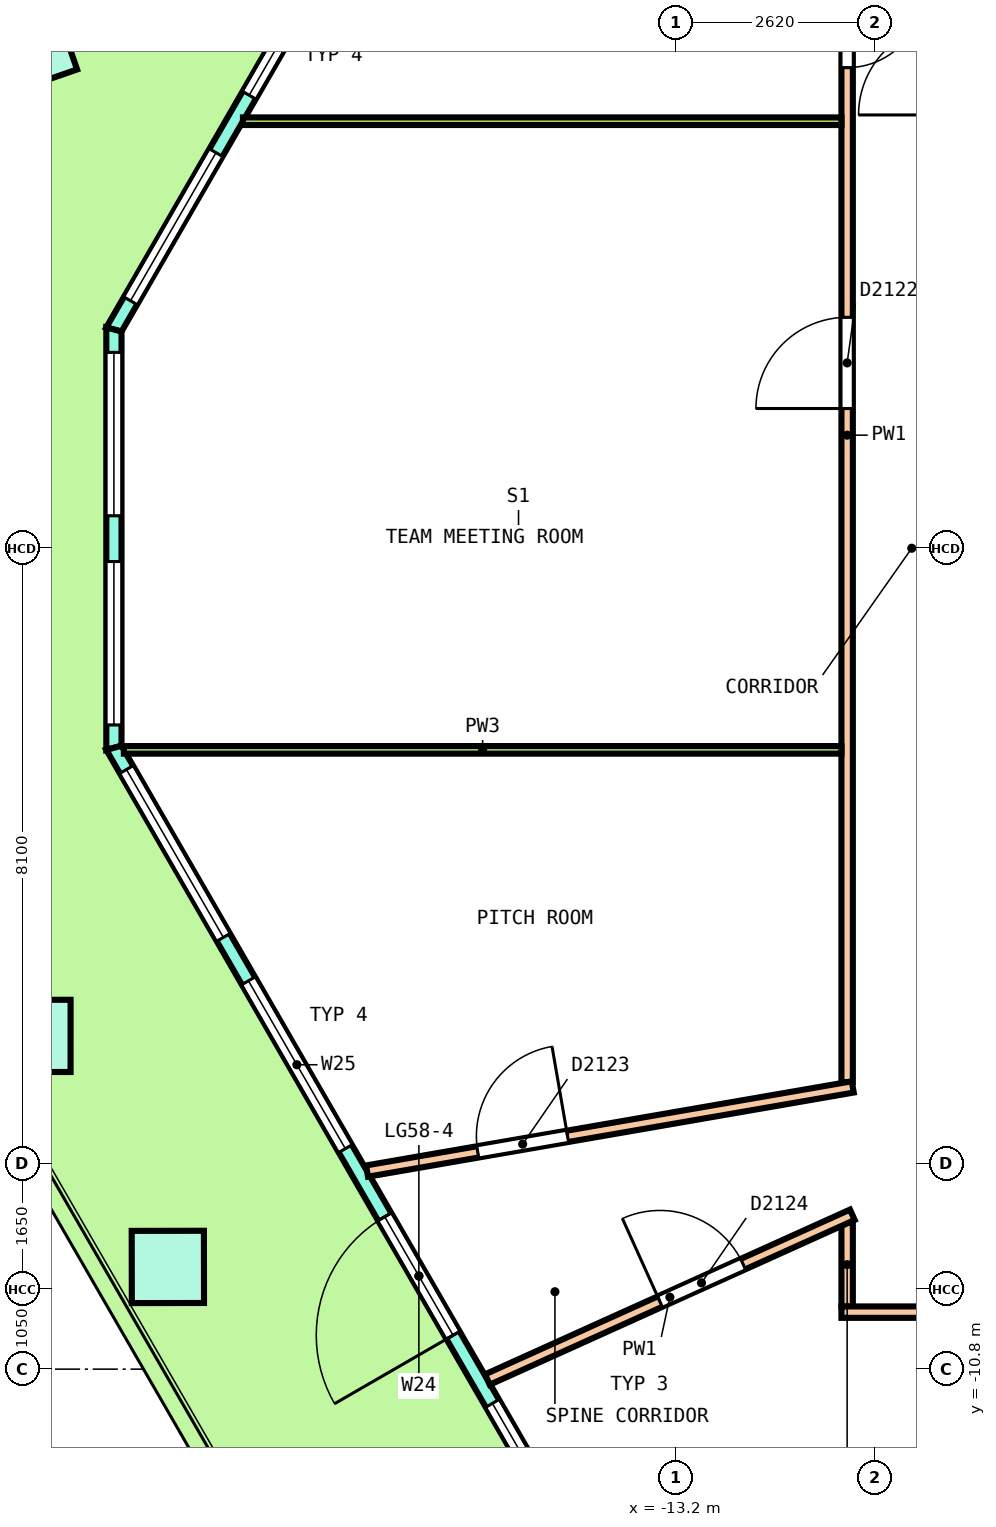
"""IFC4 building model, lengths in metres.
Left out: names, types, materials, properties, quantities, classifications, styles, units other than length and angle.
Written with IfcOpenShell. Run it as: python <this file> out.ifc"""

import sys

from ifc_helpers import new_model, si_unit, direction, frame, frame_2d, origin, origin_2d, place, context, subcontext, project, spatial, polyline, rectangle, outline, extrude, element, fill, save


model = new_model("IFC4")
c1 = context("Model", 3, precision=1e-05, world=origin(), true_north=direction((0.0, 1.0)))
c2 = subcontext(c1, "Body", "Model", "MODEL_VIEW")
j1 = project(units=[si_unit("LENGTHUNIT", "METRE"), si_unit("PLANEANGLEUNIT", "RADIAN")], contexts=[c1])
p1 = place(None, origin())
s1 = spatial("IfcSite", under=j1, at=p1, CompositionType="ELEMENT")
p2 = place(p1, origin())
s2 = spatial("IfcBuilding", under=s1, at=p2, CompositionType="ELEMENT")
p3 = place(p2, frame((0.0, 0.0, 267.0)))
s3 = spatial("IfcBuildingStorey", under=s2, at=p3, CompositionType="ELEMENT", Elevation=267.0)
p4 = place(p3, frame((-21.685, 6.592, 0.0), z_axis=(-0.021793949015, 0.025136579231, 0.999446434868), x_axis=(-0.499665408411, -0.866150057728, 0.010888394553)))
e1 = element("IfcColumn", 1, at=p4, inside=s3, PredefinedType="COLUMN", context=c2, shape_type="SweptSolid", body=[
    extrude(rectangle(XDim=0.95, YDim=0.95, at=origin_2d()), origin(), (0.0, 0.0, 1.0), 3.652),
])
p5 = place(p3, frame((-21.642, -6.416, 0.0), z_axis=(-0.010900423214, 0.018858400897, 0.999762742599), x_axis=(0.500226175498, -0.86562076849, 0.02178206845)))
e2 = element("IfcColumn", 2, at=p5, inside=s3, PredefinedType="COLUMN", context=c2, shape_type="SweptSolid", body=[
    extrude(rectangle(XDim=0.95, YDim=0.95, at=origin_2d()), origin(), (0.0, 0.0, 1.0), 3.651),
])
p6 = place(p3, frame((-19.887, -9.455, 0.0), z_axis=(-0.003611945175, 0.00628746012, 0.999973710503), x_axis=(0.499382072477, -0.866351526517, 0.007251081967)))
e3 = element("IfcColumn", 3, at=p6, inside=s3, PredefinedType="COLUMN", context=c2, shape_type="SweptSolid", body=[
    extrude(rectangle(XDim=0.95, YDim=0.95, at=origin_2d()), origin(), (0.0, 0.0, 1.0), 3.65),
])
p7 = place(p3, frame((-12.79, 16.398, 0.0), z_axis=(0.0, 0.0, 1.0), x_axis=(-0.500008968961, -0.86602022549, 0.0)))
e4 = element("IfcWall", 4, at=p7, inside=s3, PredefinedType="SOLIDWALL", context=c2, shape_type="SweptSolid", body=[
    extrude(outline(polyline([(-0.027, -0.1), (1.018, -0.1), (2.062, -0.1), (3.106, -0.1), (4.151, -0.1), (5.195, -0.1), (6.24, -0.1), (7.284, -0.1), (8.328, -0.1), (9.373, -0.1), (10.417, -0.1), (11.462, -0.1), (12.506, -0.1), (13.551, -0.1), (14.595, -0.1), (15.639, -0.1), (15.586, 0.1), (14.548, 0.1), (13.511, 0.1), (12.474, 0.1), (11.437, 0.1), (10.399, 0.1), (9.362, 0.1), (8.325, 0.1), (7.288, 0.1), (6.25, 0.1), (5.213, 0.1), (4.176, 0.1), (3.139, 0.1), (2.101, 0.1), (1.064, 0.1), (0.027, 0.1), (-0.027, -0.1)])), origin(), (0.0, 0.0, 1.0), 3.7),
])
p8 = place(p7, frame((0.436, 0.0, 0.1)))
e5 = element("IfcOpeningElement", 5, at=p8, cuts=e4, PredefinedType="OPENING", context=c2, shape_type="SweptSolid", body=[
    extrude(rectangle(XDim=2.25, YDim=2.75, at=frame_2d((1.125, 1.375))), frame((0.0, 0.11, 0.0), z_axis=(0.0, -1.0, 0.0), x_axis=(1.0, 0.0, 0.0)), (0.0, 0.0, 1.0), 0.22),
])
p9 = place(p7, frame((3.559, 0.0, 0.1)))
e6 = element("IfcOpeningElement", 6, at=p9, cuts=e4, PredefinedType="OPENING", context=c2, shape_type="SweptSolid", body=[
    extrude(rectangle(XDim=2.25, YDim=2.75, at=frame_2d((1.125, 1.375))), frame((0.0, 0.11, 0.0), z_axis=(0.0, -1.0, 0.0), x_axis=(1.0, 0.0, 0.0)), (0.0, 0.0, 1.0), 0.22),
])
p10 = place(p7, frame((6.906, 0.0, 0.0)))
e7 = element("IfcOpeningElement", 7, at=p10, cuts=e4, PredefinedType="OPENING", context=c2, shape_type="SweptSolid", body=[
    extrude(rectangle(XDim=1.8, YDim=2.4, at=frame_2d((0.9, 1.2))), frame((0.0, 0.11, 0.0), z_axis=(0.0, -1.0, 0.0), x_axis=(1.0, 0.0, 0.0)), (0.0, 0.0, 1.0), 0.22),
])
p11 = place(p7, frame((6.906, 0.0, 2.55)))
e8 = element("IfcOpeningElement", 8, at=p11, cuts=e4, PredefinedType="OPENING", context=c2, shape_type="SweptSolid", body=[
    extrude(rectangle(XDim=1.8, YDim=0.3, at=frame_2d((0.9, 0.15))), frame((0.0, 0.11, 0.0), z_axis=(0.0, -1.0, 0.0), x_axis=(1.0, 0.0, 0.0)), (0.0, 0.0, 1.0), 0.22),
])
p12 = place(p7, frame((9.804, 0.0, 0.1)))
e9 = element("IfcOpeningElement", 9, at=p12, cuts=e4, PredefinedType="OPENING", context=c2, shape_type="SweptSolid", body=[
    extrude(rectangle(XDim=2.25, YDim=2.75, at=frame_2d((1.125, 1.375))), frame((0.0, 0.11, 0.0), z_axis=(0.0, -1.0, 0.0), x_axis=(1.0, 0.0, 0.0)), (0.0, 0.0, 1.0), 0.22),
])
p13 = place(p7, frame((12.926, 0.0, 0.1)))
e10 = element("IfcOpeningElement", 10, at=p13, cuts=e4, PredefinedType="OPENING", context=c2, shape_type="SweptSolid", body=[
    extrude(rectangle(XDim=2.25, YDim=2.75, at=frame_2d((1.125, 1.375))), frame((0.0, 0.11, 0.0), z_axis=(0.0, -1.0, 0.0), x_axis=(1.0, 0.0, 0.0)), (0.0, 0.0, 1.0), 0.22),
])
p14 = place(p3, frame((-20.596, 2.877, 0.0), z_axis=(0.0, 0.0, 1.0), x_axis=(0.0, -1.0, 0.0)))
e11 = element("IfcWall", 11, at=p14, inside=s3, PredefinedType="SOLIDWALL", context=c2, shape_type="SweptSolid", body=[
    extrude(outline(polyline([(-0.027, -0.1), (1.084, -0.1), (2.196, -0.1), (3.307, -0.1), (4.419, -0.1), (5.53, -0.1), (5.477, 0.1), (4.387, 0.1), (3.297, 0.1), (2.207, 0.1), (1.117, 0.1), (0.027, 0.1), (-0.027, -0.1)])), origin(), (0.0, 0.0, 1.0), 3.7),
])
p15 = place(p14, frame((0.301, 0.0, 0.1)))
e12 = element("IfcOpeningElement", 12, at=p15, cuts=e11, PredefinedType="OPENING", context=c2, shape_type="SweptSolid", body=[
    extrude(rectangle(XDim=2.15, YDim=2.75, at=frame_2d((1.075, 1.375))), frame((0.0, 0.11, 0.0), z_axis=(0.0, -1.0, 0.0), x_axis=(1.0, 0.0, 0.0)), (0.0, 0.0, 1.0), 0.22),
])
p16 = place(p14, frame((3.052, 0.0, 0.1)))
e13 = element("IfcOpeningElement", 13, at=p16, cuts=e11, PredefinedType="OPENING", context=c2, shape_type="SweptSolid", body=[
    extrude(rectangle(XDim=2.15, YDim=2.75, at=frame_2d((1.075, 1.375))), frame((0.0, 0.11, 0.0), z_axis=(0.0, -1.0, 0.0), x_axis=(1.0, 0.0, 0.0)), (0.0, 0.0, 1.0), 0.22),
])
p17 = place(p3, frame((-20.596, -2.626, 0.0), z_axis=(0.0, 0.0, 1.0), x_axis=(0.499997245374, -0.866026994163, 0.0)))
e14 = element("IfcWall", 14, at=p17, inside=s3, PredefinedType="SOLIDWALL", context=c2, shape_type="SweptSolid", body=[
    extrude(outline(polyline([(-0.027, -0.1), (0.979, -0.1), (1.986, -0.1), (2.992, -0.1), (3.999, -0.1), (5.005, -0.1), (6.011, -0.1), (7.018, -0.1), (8.024, -0.1), (9.03, -0.1), (10.037, -0.1), (11.043, -0.1), (12.049, -0.1), (13.056, -0.1), (14.062, -0.1), (15.068, -0.1), (16.075, -0.1), (16.021, 0.1), (15.021, 0.1), (14.022, 0.1), (13.022, 0.1), (12.022, 0.1), (11.023, 0.1), (10.023, 0.1), (9.023, 0.1), (8.024, 0.1), (7.024, 0.1), (6.025, 0.1), (5.025, 0.1), (4.025, 0.1), (3.026, 0.1), (2.026, 0.1), (1.026, 0.1), (0.027, 0.1), (-0.027, -0.1)])), origin(), (0.0, 0.0, 1.0), 3.7),
])
p18 = place(p17, frame((0.33, 0.0, 0.1)))
e15 = element("IfcOpeningElement", 15, at=p18, cuts=e14, PredefinedType="OPENING", context=c2, shape_type="SweptSolid", body=[
    extrude(rectangle(XDim=2.55, YDim=2.75, at=frame_2d((1.275, 1.375))), frame((0.0, 0.11, 0.0), z_axis=(0.0, -1.0, 0.0), x_axis=(1.0, 0.0, 0.0)), (0.0, 0.0, 1.0), 0.22),
])
p19 = place(p17, frame((3.539, 0.0, 0.1)))
e16 = element("IfcOpeningElement", 16, at=p19, cuts=e14, PredefinedType="OPENING", context=c2, shape_type="SweptSolid", body=[
    extrude(rectangle(XDim=2.55, YDim=2.75, at=frame_2d((1.275, 1.375))), frame((0.0, 0.11, 0.0), z_axis=(0.0, -1.0, 0.0), x_axis=(1.0, 0.0, 0.0)), (0.0, 0.0, 1.0), 0.22),
])
p20 = place(p17, frame((7.124, 0.0, 0.0)))
e17 = element("IfcOpeningElement", 17, at=p20, cuts=e14, PredefinedType="OPENING", context=c2, shape_type="SweptSolid", body=[
    extrude(rectangle(XDim=1.8, YDim=2.4, at=frame_2d((0.9, 1.2))), frame((0.0, 0.11, 0.0), z_axis=(0.0, -1.0, 0.0), x_axis=(1.0, 0.0, 0.0)), (0.0, 0.0, 1.0), 0.22),
])
p21 = place(p17, frame((7.124, 0.0, 2.55)))
e18 = element("IfcOpeningElement", 18, at=p21, cuts=e14, PredefinedType="OPENING", context=c2, shape_type="SweptSolid", body=[
    extrude(rectangle(XDim=1.8, YDim=0.3, at=frame_2d((0.9, 0.15))), frame((0.0, 0.11, 0.0), z_axis=(0.0, -1.0, 0.0), x_axis=(1.0, 0.0, 0.0)), (0.0, 0.0, 1.0), 0.22),
])
p22 = place(p17, frame((9.958, 0.0, 0.1)))
e19 = element("IfcOpeningElement", 19, at=p22, cuts=e14, PredefinedType="OPENING", context=c2, shape_type="SweptSolid", body=[
    extrude(rectangle(XDim=2.55, YDim=2.75, at=frame_2d((1.275, 1.375))), frame((0.0, 0.11, 0.0), z_axis=(0.0, -1.0, 0.0), x_axis=(1.0, 0.0, 0.0)), (0.0, 0.0, 1.0), 0.22),
])
p23 = place(p17, frame((13.168, 0.0, 0.1)))
e20 = element("IfcOpeningElement", 20, at=p23, cuts=e14, PredefinedType="OPENING", context=c2, shape_type="SweptSolid", body=[
    extrude(rectangle(XDim=2.55, YDim=2.75, at=frame_2d((1.275, 1.375))), frame((0.0, 0.11, 0.0), z_axis=(0.0, -1.0, 0.0), x_axis=(1.0, 0.0, 0.0)), (0.0, 0.0, 1.0), 0.22),
])
p24 = place(p3, frame((-10.95, -9.975, 0.0), z_axis=(0.0, 0.0, 1.0), x_axis=(0.0, 1.0, 0.0)))
e21 = element("IfcWall", 21, at=p24, inside=s3, PredefinedType="PARTITIONING", context=c2, shape_type="SweptSolid", body=[
    extrude(rectangle(XDim=1.1, YDim=0.15, at=frame_2d((0.55, 0.0))), origin(), (0.0, 0.0, 1.0), 3.7),
])
p25 = place(p3, frame((-10.95, -7.025, 0.0), z_axis=(0.0, 0.0, 1.0), x_axis=(0.0, 1.0, 0.0)))
e22 = element("IfcWall", 22, at=p25, inside=s3, PredefinedType="PARTITIONING", context=c2, shape_type="SweptSolid", body=[
    extrude(rectangle(XDim=17.025, YDim=0.15, at=frame_2d((8.512, 0.0))), origin(), (0.0, 0.0, 1.0), 2.9),
])
p26 = place(p25, frame((13.347, 0.0, 0.0)))
e23 = element("IfcOpeningElement", 23, at=p26, cuts=e22, PredefinedType="OPENING", context=c2, shape_type="SweptSolid", body=[
    extrude(rectangle(XDim=1.0, YDim=2.1, at=frame_2d((0.5, 1.05))), frame((0.0, 0.085, 0.0), z_axis=(0.0, -1.0, 0.0), x_axis=(1.0, 0.0, 0.0)), (0.0, 0.0, 1.0), 0.17),
])
p27 = place(p25, frame((8.863, 0.0, 0.0)))
e24 = element("IfcOpeningElement", 24, at=p27, cuts=e22, PredefinedType="OPENING", context=c2, shape_type="SweptSolid", body=[
    extrude(rectangle(XDim=1.2, YDim=2.1, at=frame_2d((0.6, 1.05))), frame((0.0, 0.085, 0.0), z_axis=(0.0, -1.0, 0.0), x_axis=(1.0, 0.0, 0.0)), (0.0, 0.0, 1.0), 0.17),
])
p28 = place(p3, frame((-11.025, -10.05, 0.0), z_axis=(0.0, 0.0, 1.0), x_axis=(1.0, 0.0, 0.0)))
e25 = element("IfcWall", 25, at=p28, inside=s3, PredefinedType="PARTITIONING", context=c2, shape_type="SweptSolid", body=[
    extrude(rectangle(XDim=21.925, YDim=0.15, at=frame_2d((10.962, 0.0))), origin(), (0.0, 0.0, 1.0), 2.9),
])
p29 = place(p28, frame((6.167, 0.0, 0.0)))
e26 = element("IfcOpeningElement", 26, at=p29, cuts=e25, PredefinedType="OPENING", context=c2, shape_type="SweptSolid", body=[
    extrude(rectangle(XDim=1.2, YDim=2.1, at=frame_2d((0.6, 1.05))), frame((0.0, 0.085, 0.0), z_axis=(0.0, -1.0, 0.0), x_axis=(1.0, 0.0, 0.0)), (0.0, 0.0, 1.0), 0.17),
])
p30 = place(p28, frame((14.635, 0.0, 0.0)))
e27 = element("IfcOpeningElement", 27, at=p30, cuts=e25, PredefinedType="OPENING", context=c2, shape_type="SweptSolid", body=[
    extrude(rectangle(XDim=1.2, YDim=2.1, at=frame_2d((0.6, 1.05))), frame((0.0, 0.085, 0.0), z_axis=(0.0, -1.0, 0.0), x_axis=(1.0, 0.0, 0.0)), (0.0, 0.0, 1.0), 0.17),
])
p31 = place(p3, frame((-17.266, -8.194, 0.0), z_axis=(0.0, 0.0, 1.0), x_axis=(0.985324824704, 0.170689747267, 0.0)))
e28 = element("IfcWall", 28, at=p31, inside=s3, PredefinedType="PARTITIONING", context=c2, shape_type="SweptSolid", body=[
    extrude(rectangle(XDim=6.485, YDim=0.15, at=frame_2d((3.243, 0.0))), origin(), (0.0, 0.0, 1.0), 2.9),
])
p32 = place(p31, frame((1.478, 0.0, 0.0)))
e29 = element("IfcOpeningElement", 29, at=p32, cuts=e28, PredefinedType="OPENING", context=c2, shape_type="SweptSolid", body=[
    extrude(rectangle(XDim=1.2, YDim=2.1, at=frame_2d((0.6, 1.05))), frame((0.0, 0.085, 0.0), z_axis=(0.0, -1.0, 0.0), x_axis=(1.0, 0.0, 0.0)), (0.0, 0.0, 1.0), 0.17),
])
p33 = place(p3, frame((-15.683, -10.937, 0.0), z_axis=(0.0, 0.0, 1.0), x_axis=(0.911404805629, 0.411510972244, 0.0)))
e30 = element("IfcWall", 30, at=p33, inside=s3, PredefinedType="PARTITIONING", context=c2, shape_type="SweptSolid", body=[
    extrude(rectangle(XDim=5.268, YDim=0.15, at=frame_2d((2.634, 0.0))), origin(), (0.0, 0.0, 1.0), 2.9),
])
p34 = place(p33, frame((2.49, 0.0, 0.0)))
e31 = element("IfcOpeningElement", 31, at=p34, cuts=e30, PredefinedType="OPENING", context=c2, shape_type="SweptSolid", body=[
    extrude(rectangle(XDim=1.2, YDim=2.1, at=frame_2d((0.6, 1.05))), frame((0.0, 0.085, 0.0), z_axis=(0.0, -1.0, 0.0), x_axis=(1.0, 0.0, 0.0)), (0.0, 0.0, 1.0), 0.17),
])
p35 = place(p3, frame((-18.899, 5.618, 0.0), z_axis=(0.0, 0.0, 1.0), x_axis=(1.0, 0.0, 0.0)))
e32 = element("IfcWall", 32, at=p35, inside=s3, PredefinedType="PARTITIONING", context=c2, shape_type="SweptSolid", body=[
    extrude(rectangle(XDim=7.874, YDim=0.1, at=frame_2d((3.937, 0.0))), origin(), (0.0, 0.0, 1.0), 2.9),
])
p36 = place(p3, frame((-20.466, -2.653, 0.0), z_axis=(0.0, 0.0, 1.0), x_axis=(1.0, 0.0, 0.0)))
e33 = element("IfcWall", 33, at=p36, inside=s3, PredefinedType="PARTITIONING", context=c2, shape_type="SweptSolid", body=[
    extrude(rectangle(XDim=9.441, YDim=0.1, at=frame_2d((4.72, 0.0))), origin(), (0.0, 0.0, 1.0), 2.9),
])
p37 = place(p12, origin())
e34 = element("IfcWindow", 34, at=p37, inside=s3, PartitioningType="SINGLE_PANEL", PredefinedType="WINDOW", context=c2, shape_type="SweptSolid", body=[
    extrude(rectangle(XDim=2.25, YDim=2.75, at=frame_2d((1.125, 1.375))), frame((0.0, 0.03, 0.0), z_axis=(0.0, -1.0, 0.0), x_axis=(1.0, 0.0, 0.0)), (0.0, 0.0, 1.0), 0.06),
])
fill(e9, e34)
p38 = place(p13, origin())
e35 = element("IfcWindow", 35, at=p38, inside=s3, PartitioningType="SINGLE_PANEL", PredefinedType="WINDOW", context=c2, shape_type="SweptSolid", body=[
    extrude(rectangle(XDim=2.25, YDim=2.75, at=frame_2d((1.125, 1.375))), frame((0.0, 0.03, 0.0), z_axis=(0.0, -1.0, 0.0), x_axis=(1.0, 0.0, 0.0)), (0.0, 0.0, 1.0), 0.06),
])
fill(e10, e35)
p39 = place(p15, origin())
e36 = element("IfcWindow", 36, at=p39, inside=s3, PartitioningType="SINGLE_PANEL", PredefinedType="WINDOW", context=c2, shape_type="SweptSolid", body=[
    extrude(rectangle(XDim=2.15, YDim=2.75, at=frame_2d((1.075, 1.375))), frame((0.0, 0.03, 0.0), z_axis=(0.0, -1.0, 0.0), x_axis=(1.0, 0.0, 0.0)), (0.0, 0.0, 1.0), 0.06),
])
fill(e12, e36)
p40 = place(p16, origin())
e37 = element("IfcWindow", 37, at=p40, inside=s3, PartitioningType="SINGLE_PANEL", PredefinedType="WINDOW", context=c2, shape_type="SweptSolid", body=[
    extrude(rectangle(XDim=2.15, YDim=2.75, at=frame_2d((1.075, 1.375))), frame((0.0, 0.03, 0.0), z_axis=(0.0, -1.0, 0.0), x_axis=(1.0, 0.0, 0.0)), (0.0, 0.0, 1.0), 0.06),
])
fill(e13, e37)
p41 = place(p18, origin())
e38 = element("IfcWindow", 38, at=p41, inside=s3, PartitioningType="SINGLE_PANEL", PredefinedType="WINDOW", context=c2, shape_type="SweptSolid", body=[
    extrude(rectangle(XDim=2.55, YDim=2.75, at=frame_2d((1.275, 1.375))), frame((0.0, 0.03, 0.0), z_axis=(0.0, -1.0, 0.0), x_axis=(1.0, 0.0, 0.0)), (0.0, 0.0, 1.0), 0.06),
])
fill(e15, e38)
p42 = place(p19, origin())
e39 = element("IfcWindow", 39, at=p42, inside=s3, PartitioningType="SINGLE_PANEL", PredefinedType="WINDOW", context=c2, shape_type="SweptSolid", body=[
    extrude(rectangle(XDim=2.55, YDim=2.75, at=frame_2d((1.275, 1.375))), frame((0.0, 0.03, 0.0), z_axis=(0.0, -1.0, 0.0), x_axis=(1.0, 0.0, 0.0)), (0.0, 0.0, 1.0), 0.06),
])
fill(e16, e39)
p43 = place(p20, origin())
e40 = element("IfcDoor", 40, at=p43, inside=s3, OperationType="DOUBLE_DOOR_SINGLE_SWING", PredefinedType="DOOR", context=c2, shape_type="SweptSolid", body=[
    extrude(rectangle(XDim=1.8, YDim=2.4, at=frame_2d((0.9, 1.2))), frame((0.0, 0.025, 0.0), z_axis=(0.0, -1.0, 0.0), x_axis=(1.0, 0.0, 0.0)), (0.0, 0.0, 1.0), 0.05),
])
fill(e17, e40)
p44 = place(p21, origin())
e41 = element("IfcWindow", 41, at=p44, inside=s3, PartitioningType="SINGLE_PANEL", PredefinedType="WINDOW", context=c2, shape_type="SweptSolid", body=[
    extrude(rectangle(XDim=1.8, YDim=0.3, at=frame_2d((0.9, 0.15))), frame((0.0, 0.03, 0.0), z_axis=(0.0, -1.0, 0.0), x_axis=(1.0, 0.0, 0.0)), (0.0, 0.0, 1.0), 0.06),
])
fill(e18, e41)
p45 = place(p22, origin())
e42 = element("IfcWindow", 42, at=p45, inside=s3, PartitioningType="SINGLE_PANEL", PredefinedType="WINDOW", context=c2, shape_type="SweptSolid", body=[
    extrude(rectangle(XDim=2.55, YDim=2.75, at=frame_2d((1.275, 1.375))), frame((0.0, 0.03, 0.0), z_axis=(0.0, -1.0, 0.0), x_axis=(1.0, 0.0, 0.0)), (0.0, 0.0, 1.0), 0.06),
])
fill(e19, e42)
p46 = place(p26, origin())
e43 = element("IfcDoor", 43, at=p46, inside=s3, OperationType="SINGLE_SWING_LEFT", PredefinedType="DOOR", context=c2, shape_type="SweptSolid", body=[
    extrude(rectangle(XDim=1.0, YDim=2.1, at=frame_2d((0.5, 1.05))), frame((0.0, 0.025, 0.0), z_axis=(0.0, -1.0, 0.0), x_axis=(1.0, 0.0, 0.0)), (0.0, 0.0, 1.0), 0.05),
])
fill(e23, e43)
p47 = place(p27, origin())
e44 = element("IfcDoor", 44, at=p47, inside=s3, OperationType="DOUBLE_DOOR_SINGLE_SWING", PredefinedType="DOOR", context=c2, shape_type="SweptSolid", body=[
    extrude(rectangle(XDim=1.2, YDim=2.1, at=frame_2d((0.6, 1.05))), frame((0.0, 0.025, 0.0), z_axis=(0.0, -1.0, 0.0), x_axis=(1.0, 0.0, 0.0)), (0.0, 0.0, 1.0), 0.05),
])
fill(e24, e44)
p48 = place(p32, origin())
e45 = element("IfcDoor", 45, at=p48, inside=s3, OperationType="DOUBLE_DOOR_SINGLE_SWING", PredefinedType="DOOR", context=c2, shape_type="SweptSolid", body=[
    extrude(rectangle(XDim=1.2, YDim=2.1, at=frame_2d((0.6, 1.05))), frame((0.0, 0.025, 0.0), z_axis=(0.0, -1.0, 0.0), x_axis=(1.0, 0.0, 0.0)), (0.0, 0.0, 1.0), 0.05),
])
fill(e29, e45)
p49 = place(p34, origin())
e46 = element("IfcDoor", 46, at=p49, inside=s3, OperationType="DOUBLE_DOOR_SINGLE_SWING", PredefinedType="DOOR", context=c2, shape_type="SweptSolid", body=[
    extrude(rectangle(XDim=1.2, YDim=2.1, at=frame_2d((0.6, 1.05))), frame((0.0, 0.025, 0.0), z_axis=(0.0, -1.0, 0.0), x_axis=(1.0, 0.0, 0.0)), (0.0, 0.0, 1.0), 0.05),
])
fill(e31, e46)
save(model, sys.argv[1])
